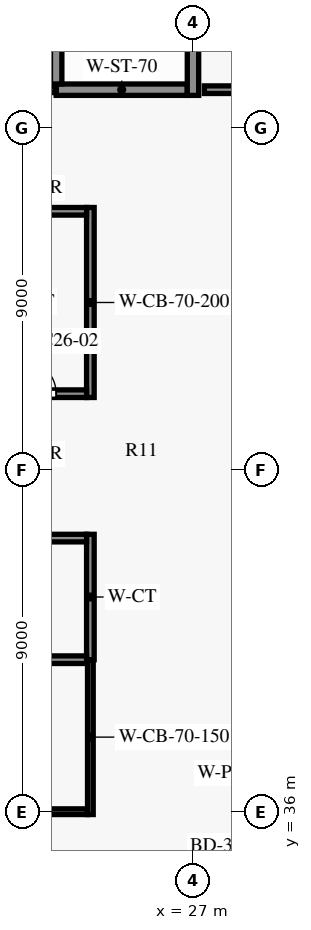
"""IFC4 building model, lengths in metres.
Left out: names, types, materials, properties, quantities, classifications, styles, units other than length and angle.
Written with IfcOpenShell. Run it as: python <this file> out.ifc"""

import sys

from ifc_helpers import new_model, si_unit, direction, frame, frame_2d, origin, place, context, subcontext, project, spatial, rectangle, extrude, element, fill, save


model = new_model("IFC4")
c1 = context("Model", 3, precision=1e-05, world=origin(), true_north=direction((0.0, 1.0)))
c2 = subcontext(c1, "Body", "Model", "MODEL_VIEW")
j1 = project(units=[si_unit("LENGTHUNIT", "METRE"), si_unit("PLANEANGLEUNIT", "RADIAN")], contexts=[c1])
p1 = place(None, origin())
s1 = spatial("IfcSite", under=j1, at=p1, CompositionType="ELEMENT")
p2 = place(p1, origin())
s2 = spatial("IfcBuilding", under=s1, at=p2, CompositionType="ELEMENT")
p3 = place(p2, frame((0.0, 0.0, 192.8)))
s3 = spatial("IfcBuildingStorey", under=s2, at=p3, CompositionType="ELEMENT", Elevation=192.8)
p4 = place(p3, frame((12.4, 36.0, 0.0), z_axis=(0.0, 0.0, 1.0), x_axis=(1.0, 0.0, 0.0)))
e1 = element("IfcWall", 1, at=p4, inside=s3, PredefinedType="SHEAR", context=c2, shape_type="SweptSolid", body=[
    extrude(rectangle(XDim=11.825, YDim=0.15, at=frame_2d((5.913, 0.0))), origin(), (0.0, 0.0, 1.0), 5.7),
])
p5 = place(p4, frame((1.25, 0.0, 0.0)))
e2 = element("IfcOpeningElement", 2, at=p5, cuts=e1, PredefinedType="OPENING", context=c2, shape_type="SweptSolid", body=[
    extrude(rectangle(XDim=0.9, YDim=2.1, at=frame_2d((0.45, 1.05))), frame((0.0, 0.085, 0.0), z_axis=(0.0, -1.0, 0.0), x_axis=(1.0, 0.0, 0.0)), (0.0, 0.0, 1.0), 0.17),
])
p6 = place(p4, frame((5.2, 0.0, 0.0)))
e3 = element("IfcOpeningElement", 3, at=p6, cuts=e1, PredefinedType="OPENING", context=c2, shape_type="SweptSolid", body=[
    extrude(rectangle(XDim=0.9, YDim=2.1, at=frame_2d((0.45, 1.05))), frame((0.0, 0.085, 0.0), z_axis=(0.0, -1.0, 0.0), x_axis=(1.0, 0.0, 0.0)), (0.0, 0.0, 1.0), 0.17),
])
p7 = place(p4, frame((9.425, 0.0, 0.0)))
e4 = element("IfcOpeningElement", 4, at=p7, cuts=e1, PredefinedType="OPENING", context=c2, shape_type="SweptSolid", body=[
    extrude(rectangle(XDim=0.95, YDim=2.1, at=frame_2d((0.475, 1.05))), frame((0.0, 0.085, 0.0), z_axis=(0.0, -1.0, 0.0), x_axis=(1.0, 0.0, 0.0)), (0.0, 0.0, 1.0), 0.17),
])
p8 = place(p3, frame((8.1, 40.0, 0.0), z_axis=(0.0, 0.0, 1.0), x_axis=(1.0, 0.0, 0.0)))
e5 = element("IfcWall", 5, at=p8, inside=s3, PredefinedType="PARTITIONING", context=c2, shape_type="SweptSolid", body=[
    extrude(rectangle(XDim=16.1, YDim=0.2, at=frame_2d((8.05, 0.0))), origin(), (0.0, 0.0, 1.0), 5.7),
])
p9 = place(p3, frame((8.1, 43.2, 0.0), z_axis=(0.0, 0.0, 1.0), x_axis=(1.0, 0.0, 0.0)))
e6 = element("IfcWall", 6, at=p9, inside=s3, PredefinedType="PARTITIONING", context=c2, shape_type="SweptSolid", body=[
    extrude(rectangle(XDim=16.1, YDim=0.2, at=frame_2d((8.05, 0.0))), origin(), (0.0, 0.0, 1.0), 5.7),
])
p10 = place(p9, frame((4.05, 0.0, 0.0)))
e7 = element("IfcOpeningElement", 7, at=p10, cuts=e6, PredefinedType="OPENING", context=c2, shape_type="SweptSolid", body=[
    extrude(rectangle(XDim=0.9, YDim=2.1, at=frame_2d((0.45, 1.05))), frame((0.0, 0.11, 0.0), z_axis=(0.0, -1.0, 0.0), x_axis=(1.0, 0.0, 0.0)), (0.0, 0.0, 1.0), 0.22),
])
p11 = place(p9, frame((12.15, 0.0, 0.0)))
e8 = element("IfcOpeningElement", 8, at=p11, cuts=e6, PredefinedType="OPENING", context=c2, shape_type="SweptSolid", body=[
    extrude(rectangle(XDim=0.9, YDim=2.1, at=frame_2d((0.45, 1.05))), frame((0.0, 0.11, 0.0), z_axis=(0.0, -1.0, 0.0), x_axis=(1.0, 0.0, 0.0)), (0.0, 0.0, 1.0), 0.22),
])
p12 = place(p3, frame((21.6, 47.0, 0.0), z_axis=(0.0, 0.0, 1.0), x_axis=(1.0, 0.0, 0.0)))
e9 = element("IfcWall", 9, at=p12, inside=s3, PredefinedType="PARTITIONING", context=c2, shape_type="SweptSolid", body=[
    extrude(rectangle(XDim=2.6, YDim=0.2, at=frame_2d((1.3, 0.0))), origin(), (0.0, 0.0, 1.0), 5.7),
])
p13 = place(p12, frame((0.9, 0.0, 0.0)))
e10 = element("IfcOpeningElement", 10, at=p13, cuts=e9, PredefinedType="OPENING", context=c2, shape_type="SweptSolid", body=[
    extrude(rectangle(XDim=0.9, YDim=2.1, at=frame_2d((0.45, 1.05))), frame((0.0, 0.11, 0.0), z_axis=(0.0, -1.0, 0.0), x_axis=(1.0, 0.0, 0.0)), (0.0, 0.0, 1.0), 0.22),
])
p14 = place(p3, frame((21.6, 51.8, 0.0), z_axis=(0.0, 0.0, 1.0), x_axis=(1.0, 0.0, 0.0)))
e11 = element("IfcWall", 11, at=p14, inside=s3, PredefinedType="PARTITIONING", context=c2, shape_type="SweptSolid", body=[
    extrude(rectangle(XDim=2.6, YDim=0.2, at=frame_2d((1.3, 0.0))), origin(), (0.0, 0.0, 1.0), 5.7),
])
p15 = place(p3, frame((13.5, 55.0, 0.0), z_axis=(0.0, 0.0, 1.0), x_axis=(1.0, 0.0, 0.0)))
e12 = element("IfcWall", 12, at=p15, inside=s3, PredefinedType="PARTITIONING", context=c2, shape_type="SweptSolid", body=[
    extrude(rectangle(XDim=9.9, YDim=0.15, at=frame_2d((4.95, 0.0))), origin(), (0.0, 0.0, 1.0), 5.7),
])
p16 = place(p15, frame((4.45, 0.0, 0.0)))
e13 = element("IfcOpeningElement", 13, at=p16, cuts=e12, PredefinedType="OPENING", context=c2, shape_type="SweptSolid", body=[
    extrude(rectangle(XDim=1.0, YDim=2.1, at=frame_2d((0.5, 1.05))), frame((0.0, 0.085, 0.0), z_axis=(0.0, -1.0, 0.0), x_axis=(1.0, 0.0, 0.0)), (0.0, 0.0, 1.0), 0.17),
])
p17 = place(p3, frame((23.4, 55.0, 0.0), z_axis=(0.0, 0.0, 1.0), x_axis=(1.0, 0.0, 0.0)))
e14 = element("IfcWall", 14, at=p17, inside=s3, PredefinedType="SHEAR", context=c2, shape_type="SweptSolid", body=[
    extrude(rectangle(XDim=3.45, YDim=0.3, at=frame_2d((1.725, 0.0))), origin(), (0.0, 0.0, 1.0), 5.7),
])
p18 = place(p3, frame((23.4, 55.15, 0.0), z_axis=(0.0, 0.0, 1.0), x_axis=(0.0, 1.0, 0.0)))
e15 = element("IfcWall", 15, at=p18, inside=s3, PredefinedType="SHEAR", context=c2, shape_type="SweptSolid", body=[
    extrude(rectangle(XDim=8.0, YDim=0.3, at=frame_2d((4.0, 0.0))), origin(), (0.0, 0.0, 1.0), 5.7),
])
p19 = place(p3, frame((24.3, 35.925, 0.0), z_axis=(0.0, 0.0, 1.0), x_axis=(0.0, 1.0, 0.0)))
e16 = element("IfcWall", 16, at=p19, inside=s3, PredefinedType="SHEAR", context=c2, shape_type="SweptSolid", body=[
    extrude(rectangle(XDim=4.075, YDim=0.15, at=frame_2d((2.038, 0.0))), origin(), (0.0, 0.0, 1.0), 5.7),
])
p20 = place(p3, frame((24.3, 40.0, 0.0), z_axis=(0.0, 0.0, 1.0), x_axis=(0.0, 1.0, 0.0)))
e17 = element("IfcWall", 17, at=p20, inside=s3, PredefinedType="PARTITIONING", context=c2, shape_type="SweptSolid", body=[
    extrude(rectangle(XDim=3.3, YDim=0.2, at=frame_2d((1.65, 0.0))), origin(), (0.0, 0.0, 1.0), 5.7),
])
p21 = place(p3, frame((24.3, 46.9, 0.0), z_axis=(0.0, 0.0, 1.0), x_axis=(0.0, 1.0, 0.0)))
e18 = element("IfcWall", 18, at=p21, inside=s3, PredefinedType="SHEAR", context=c2, shape_type="SweptSolid", body=[
    extrude(rectangle(XDim=5.0, YDim=0.2, at=frame_2d((2.5, 0.0))), origin(), (0.0, 0.0, 1.0), 5.7),
])
p22 = place(p3, frame((27.0, 54.85, 0.0), z_axis=(0.0, 0.0, 1.0), x_axis=(0.0, 1.0, 0.0)))
e19 = element("IfcWall", 19, at=p22, inside=s3, PredefinedType="SHEAR", context=c2, shape_type="SweptSolid", body=[
    extrude(rectangle(XDim=8.5, YDim=0.3, at=frame_2d((4.25, 0.0))), origin(), (0.0, 0.0, 1.0), 5.7),
])
p23 = place(p22, frame((6.55, 0.0, 0.0)))
e20 = element("IfcOpeningElement", 20, at=p23, cuts=e19, PredefinedType="OPENING", context=c2, shape_type="SweptSolid", body=[
    extrude(rectangle(XDim=1.2, YDim=2.2, at=frame_2d((0.6, 1.1))), frame((0.0, 0.16, 0.0), z_axis=(0.0, -1.0, 0.0), x_axis=(1.0, 0.0, 0.0)), (0.0, 0.0, 1.0), 0.32),
])
p24 = place(p3, frame((27.3, 55.0, 0.0), z_axis=(0.0, 0.0, 1.0), x_axis=(1.0, 0.0, 0.0)))
e21 = element("IfcWall", 21, at=p24, inside=s3, PredefinedType="PARTITIONING", context=c2, shape_type="SweptSolid", body=[
    extrude(rectangle(XDim=4.3, YDim=0.2, at=frame_2d((2.15, 0.0))), origin(), (0.0, 0.0, 1.0), 5.68),
])
p25 = place(p24, frame((1.625, 0.0, 0.0)))
e22 = element("IfcOpeningElement", 22, at=p25, cuts=e21, PredefinedType="OPENING", context=c2, shape_type="SweptSolid", body=[
    extrude(rectangle(XDim=1.0, YDim=2.1, at=frame_2d((0.5, 1.05))), frame((0.0, 0.11, 0.0), z_axis=(0.0, -1.0, 0.0), x_axis=(1.0, 0.0, 0.0)), (0.0, 0.0, 1.0), 0.22),
])
p26 = place(p13, origin())
e23 = element("IfcDoor", 23, at=p26, inside=s3, OperationType="SINGLE_SWING_LEFT", PredefinedType="DOOR", context=c2, shape_type="SweptSolid", body=[
    extrude(rectangle(XDim=0.9, YDim=2.1, at=frame_2d((0.45, 1.05))), frame((0.0, 0.025, 0.0), z_axis=(0.0, -1.0, 0.0), x_axis=(1.0, 0.0, 0.0)), (0.0, 0.0, 1.0), 0.05),
])
fill(e10, e23)
save(model, sys.argv[1])
